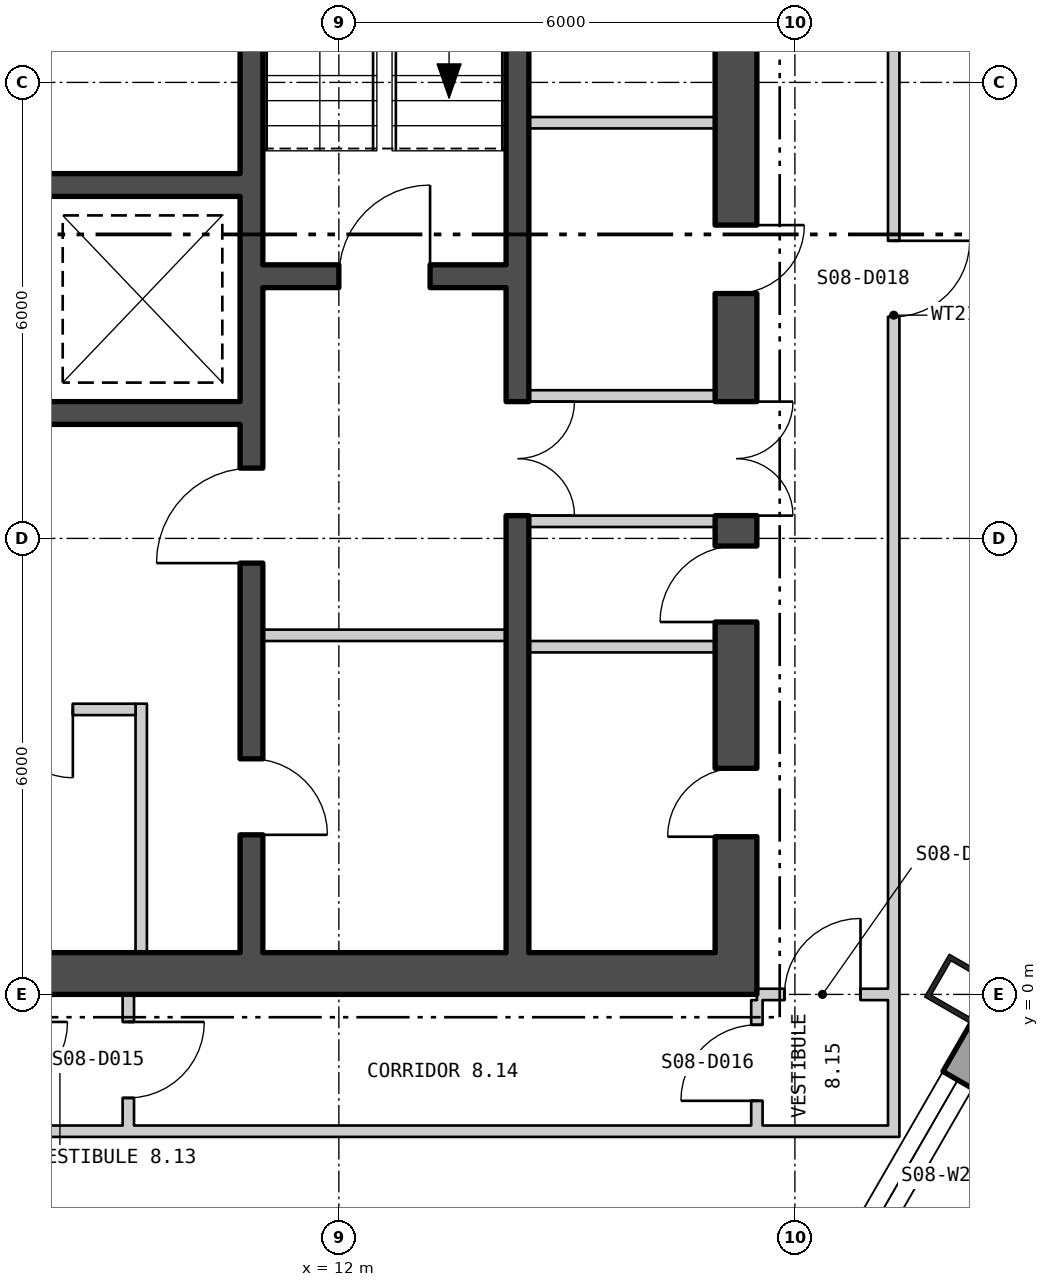
"""IFC4 building model, lengths in metres.
Left out: names, types, materials, properties, quantities, classifications, styles, units other than length and angle.
Written with IfcOpenShell. Run it as: python <this file> out.ifc"""

import sys

from ifc_helpers import new_model, si_unit, direction, frame, frame_2d, origin, origin_2d, place, context, subcontext, project, spatial, polyline, rectangle, hollow_rectangle, outline, extrude, element, fill, save


model = new_model("IFC4")
c1 = context("Model", 3, precision=1e-05, world=origin(), true_north=direction((0.0, 1.0)))
c2 = subcontext(c1, "Body", "Model", "MODEL_VIEW")
j1 = project(units=[si_unit("LENGTHUNIT", "METRE"), si_unit("PLANEANGLEUNIT", "RADIAN")], contexts=[c1])
p1 = place(None, origin())
s1 = spatial("IfcSite", under=j1, at=p1, CompositionType="ELEMENT")
p2 = place(p1, origin())
s2 = spatial("IfcBuilding", under=s1, at=p2, CompositionType="ELEMENT")
p3 = place(p2, frame((0.0, 0.0, 111.3)))
s3 = spatial("IfcBuildingStorey", under=s2, at=p3, CompositionType="ELEMENT", Elevation=111.3)
p4 = place(p3, frame((20.171, 0.074, 0.0), z_axis=(0.0, 0.0, 1.0), x_axis=(0.5, 0.866025403784, 0.0)))
e1 = element("IfcColumn", 1, at=p4, inside=s3, PredefinedType="COLUMN", context=c2, shape_type="SweptSolid", body=[
    extrude(hollow_rectangle(XDim=0.65, YDim=0.7, WallThickness=0.065, at=origin_2d()), origin(), (0.0, 0.0, 1.0), 4.5),
])
p5 = place(p3, frame((4.73, -27.821, -0.18), z_axis=(0.0, 0.0, 1.0), x_axis=(0.500000141277, 0.866025322218, 0.0)))
e2 = element("IfcWall", 2, at=p5, inside=s3, PredefinedType="SOLIDWALL", context=c2, shape_type="SweptSolid", body=[
    extrude(outline(polyline([(-0.13, -0.225), (45.86, -0.225), (45.6, 0.225), (0.13, 0.225), (-0.13, -0.225)])), origin(), (0.0, 0.0, 1.0), 4.28),
])
p6 = place(p5, frame((1.424, 0.0, 1.08)))
e3 = element("IfcOpeningElement", 3, at=p6, cuts=e2, PredefinedType="OPENING", context=c2, shape_type="SweptSolid", body=[
    extrude(rectangle(XDim=2.4, YDim=2.6, at=frame_2d((1.2, 1.3))), frame((0.0, 0.235, 0.0), z_axis=(0.0, -1.0, 0.0), x_axis=(1.0, 0.0, 0.0)), (0.0, 0.0, 1.0), 0.47),
])
p7 = place(p5, frame((5.892, 0.0, 1.08)))
e4 = element("IfcOpeningElement", 4, at=p7, cuts=e2, PredefinedType="OPENING", context=c2, shape_type="SweptSolid", body=[
    extrude(rectangle(XDim=2.4, YDim=2.6, at=frame_2d((1.2, 1.3))), frame((0.0, 0.235, 0.0), z_axis=(0.0, -1.0, 0.0), x_axis=(1.0, 0.0, 0.0)), (0.0, 0.0, 1.0), 0.47),
])
p8 = place(p5, frame((10.399, 0.0, 1.08)))
e5 = element("IfcOpeningElement", 5, at=p8, cuts=e2, PredefinedType="OPENING", context=c2, shape_type="SweptSolid", body=[
    extrude(rectangle(XDim=2.4, YDim=2.6, at=frame_2d((1.2, 1.3))), frame((0.0, 0.235, 0.0), z_axis=(0.0, -1.0, 0.0), x_axis=(1.0, 0.0, 0.0)), (0.0, 0.0, 1.0), 0.47),
])
p9 = place(p5, frame((14.905, 0.0, 1.08)))
e6 = element("IfcOpeningElement", 6, at=p9, cuts=e2, PredefinedType="OPENING", context=c2, shape_type="SweptSolid", body=[
    extrude(rectangle(XDim=2.4, YDim=2.6, at=frame_2d((1.2, 1.3))), frame((0.0, 0.235, 0.0), z_axis=(0.0, -1.0, 0.0), x_axis=(1.0, 0.0, 0.0)), (0.0, 0.0, 1.0), 0.47),
])
p10 = place(p5, frame((19.412, 0.0, 1.08)))
e7 = element("IfcOpeningElement", 7, at=p10, cuts=e2, PredefinedType="OPENING", context=c2, shape_type="SweptSolid", body=[
    extrude(rectangle(XDim=2.4, YDim=2.6, at=frame_2d((1.2, 1.3))), frame((0.0, 0.235, 0.0), z_axis=(0.0, -1.0, 0.0), x_axis=(1.0, 0.0, 0.0)), (0.0, 0.0, 1.0), 0.47),
])
p11 = place(p5, frame((23.918, 0.0, 1.08)))
e8 = element("IfcOpeningElement", 8, at=p11, cuts=e2, PredefinedType="OPENING", context=c2, shape_type="SweptSolid", body=[
    extrude(rectangle(XDim=2.4, YDim=2.6, at=frame_2d((1.2, 1.3))), frame((0.0, 0.235, 0.0), z_axis=(0.0, -1.0, 0.0), x_axis=(1.0, 0.0, 0.0)), (0.0, 0.0, 1.0), 0.47),
])
p12 = place(p5, frame((28.425, 0.0, 1.08)))
e9 = element("IfcOpeningElement", 9, at=p12, cuts=e2, PredefinedType="OPENING", context=c2, shape_type="SweptSolid", body=[
    extrude(rectangle(XDim=2.4, YDim=2.6, at=frame_2d((1.2, 1.3))), frame((0.0, 0.235, 0.0), z_axis=(0.0, -1.0, 0.0), x_axis=(1.0, 0.0, 0.0)), (0.0, 0.0, 1.0), 0.47),
])
p13 = place(p5, frame((32.932, 0.0, 1.08)))
e10 = element("IfcOpeningElement", 10, at=p13, cuts=e2, PredefinedType="OPENING", context=c2, shape_type="SweptSolid", body=[
    extrude(rectangle(XDim=2.4, YDim=2.6, at=frame_2d((1.2, 1.3))), frame((0.0, 0.235, 0.0), z_axis=(0.0, -1.0, 0.0), x_axis=(1.0, 0.0, 0.0)), (0.0, 0.0, 1.0), 0.47),
])
p14 = place(p5, frame((37.438, 0.0, 1.08)))
e11 = element("IfcOpeningElement", 11, at=p14, cuts=e2, PredefinedType="OPENING", context=c2, shape_type="SweptSolid", body=[
    extrude(rectangle(XDim=2.4, YDim=2.6, at=frame_2d((1.2, 1.3))), frame((0.0, 0.235, 0.0), z_axis=(0.0, -1.0, 0.0), x_axis=(1.0, 0.0, 0.0)), (0.0, 0.0, 1.0), 0.47),
])
p15 = place(p5, frame((41.907, 0.0, 1.08)))
e12 = element("IfcOpeningElement", 12, at=p15, cuts=e2, PredefinedType="OPENING", context=c2, shape_type="SweptSolid", body=[
    extrude(rectangle(XDim=2.4, YDim=2.6, at=frame_2d((1.2, 1.3))), frame((0.0, 0.235, 0.0), z_axis=(0.0, -1.0, 0.0), x_axis=(1.0, 0.0, 0.0)), (0.0, 0.0, 1.0), 0.47),
])
p16 = place(p3, frame((-17.5, 0.275, 0.0), z_axis=(0.0, 0.0, 1.0), x_axis=(1.0, 0.0, 0.0)))
e13 = element("IfcWall", 13, at=p16, inside=s3, PredefinedType="SHEAR", context=c2, shape_type="SweptSolid", body=[
    extrude(rectangle(XDim=35.0, YDim=0.55, at=frame_2d((17.5, 0.0))), origin(), (0.0, 0.0, 1.0), 4.3),
])
p17 = place(p16, frame((12.0, 0.0, 0.0)))
e14 = element("IfcOpeningElement", 14, at=p17, cuts=e13, PredefinedType="OPENING", context=c2, shape_type="SweptSolid", body=[
    extrude(rectangle(XDim=1.8, YDim=2.4, at=frame_2d((0.9, 1.2))), frame((0.0, 0.285, 0.0), z_axis=(0.0, -1.0, 0.0), x_axis=(1.0, 0.0, 0.0)), (0.0, 0.0, 1.0), 0.57),
])
p18 = place(p16, frame((22.0, 0.0, 0.0)))
e15 = element("IfcOpeningElement", 15, at=p18, cuts=e13, PredefinedType="OPENING", context=c2, shape_type="SweptSolid", body=[
    extrude(rectangle(XDim=1.8, YDim=2.4, at=frame_2d((0.9, 1.2))), frame((0.0, 0.285, 0.0), z_axis=(0.0, -1.0, 0.0), x_axis=(1.0, 0.0, 0.0)), (0.0, 0.0, 1.0), 0.57),
])
p19 = place(p3, frame((17.225, 0.55, 0.0), z_axis=(0.0, 0.0, 1.0), x_axis=(0.0, 1.0, 0.0)))
e16 = element("IfcWall", 16, at=p19, inside=s3, PredefinedType="SHEAR", context=c2, shape_type="SweptSolid", body=[
    extrude(rectangle(XDim=16.9, YDim=0.55, at=frame_2d((8.45, 0.0))), origin(), (0.0, 0.0, 1.0), 4.3),
])
p20 = place(p19, frame((5.75, 0.0, 0.0)))
e17 = element("IfcOpeningElement", 17, at=p20, cuts=e16, PredefinedType="OPENING", context=c2, shape_type="SweptSolid", body=[
    extrude(rectangle(XDim=1.5, YDim=2.1, at=frame_2d((0.75, 1.05))), frame((0.0, 0.285, 0.0), z_axis=(0.0, -1.0, 0.0), x_axis=(1.0, 0.0, 0.0)), (0.0, 0.0, 1.0), 0.57),
])
p21 = place(p19, frame((1.525, 0.0, 0.0)))
e18 = element("IfcOpeningElement", 18, at=p21, cuts=e16, PredefinedType="OPENING", context=c2, shape_type="SweptSolid", body=[
    extrude(rectangle(XDim=0.9, YDim=2.1, at=frame_2d((0.45, 1.05))), frame((0.0, 0.285, 0.0), z_axis=(0.0, -1.0, 0.0), x_axis=(1.0, 0.0, 0.0)), (0.0, 0.0, 1.0), 0.57),
])
p22 = place(p19, frame((4.35, 0.0, 0.0)))
e19 = element("IfcOpeningElement", 19, at=p22, cuts=e16, PredefinedType="OPENING", context=c2, shape_type="SweptSolid", body=[
    extrude(rectangle(XDim=1.0, YDim=2.1, at=frame_2d((0.5, 1.05))), frame((0.0, 0.285, 0.0), z_axis=(0.0, -1.0, 0.0), x_axis=(1.0, 0.0, 0.0)), (0.0, 0.0, 1.0), 0.57),
])
p23 = place(p19, frame((8.672, 0.0, 0.0)))
e20 = element("IfcOpeningElement", 20, at=p23, cuts=e16, PredefinedType="OPENING", context=c2, shape_type="SweptSolid", body=[
    extrude(rectangle(XDim=0.9, YDim=2.1, at=frame_2d((0.45, 1.05))), frame((0.0, 0.285, 0.0), z_axis=(0.0, -1.0, 0.0), x_axis=(1.0, 0.0, 0.0)), (0.0, 0.0, 1.0), 0.57),
])
p24 = place(p19, frame((13.497, 0.0, 0.0)))
e21 = element("IfcOpeningElement", 21, at=p24, cuts=e16, PredefinedType="OPENING", context=c2, shape_type="SweptSolid", body=[
    extrude(rectangle(XDim=0.9, YDim=2.1, at=frame_2d((0.45, 1.05))), frame((0.0, 0.285, 0.0), z_axis=(0.0, -1.0, 0.0), x_axis=(1.0, 0.0, 0.0)), (0.0, 0.0, 1.0), 0.57),
])
p25 = place(p3, frame((10.85, 0.55, 0.0), z_axis=(0.0, 0.0, 1.0), x_axis=(0.0, 1.0, 0.0)))
e22 = element("IfcWall", 22, at=p25, inside=s3, PredefinedType="SHEAR", context=c2, shape_type="SweptSolid", body=[
    extrude(rectangle(XDim=16.9, YDim=0.3, at=frame_2d((8.45, 0.0))), origin(), (0.0, 0.0, 1.0), 4.3),
])
p26 = place(p25, frame((5.125, 0.0, 0.0)))
e23 = element("IfcOpeningElement", 23, at=p26, cuts=e22, PredefinedType="OPENING", context=c2, shape_type="SweptSolid", body=[
    extrude(rectangle(XDim=1.25, YDim=2.1, at=frame_2d((0.625, 1.05))), frame((0.0, 0.16, 0.0), z_axis=(0.0, -1.0, 0.0), x_axis=(1.0, 0.0, 0.0)), (0.0, 0.0, 1.0), 0.32),
])
p27 = place(p25, frame((1.55, 0.0, 0.0)))
e24 = element("IfcOpeningElement", 24, at=p27, cuts=e22, PredefinedType="OPENING", context=c2, shape_type="SweptSolid", body=[
    extrude(rectangle(XDim=1.0, YDim=2.1, at=frame_2d((0.5, 1.05))), frame((0.0, 0.16, 0.0), z_axis=(0.0, -1.0, 0.0), x_axis=(1.0, 0.0, 0.0)), (0.0, 0.0, 1.0), 0.32),
])
p28 = place(p3, frame((14.35, 0.55, 0.0), z_axis=(0.0, 0.0, 1.0), x_axis=(0.0, 1.0, 0.0)))
e25 = element("IfcWall", 25, at=p28, inside=s3, PredefinedType="SHEAR", context=c2, shape_type="SweptSolid", body=[
    extrude(rectangle(XDim=16.9, YDim=0.3, at=frame_2d((8.45, 0.0))), origin(), (0.0, 0.0, 1.0), 4.3),
])
p29 = place(p28, frame((5.75, 0.0, 0.0)))
e26 = element("IfcOpeningElement", 26, at=p29, cuts=e25, PredefinedType="OPENING", context=c2, shape_type="SweptSolid", body=[
    extrude(rectangle(XDim=1.5, YDim=2.1, at=frame_2d((0.75, 1.05))), frame((0.0, 0.16, 0.0), z_axis=(0.0, -1.0, 0.0), x_axis=(1.0, 0.0, 0.0)), (0.0, 0.0, 1.0), 0.32),
])
p30 = place(p3, frame((11.0, 9.45, 0.0), z_axis=(0.0, 0.0, 1.0), x_axis=(1.0, 0.0, 0.0)))
e27 = element("IfcWall", 27, at=p30, inside=s3, PredefinedType="SHEAR", context=c2, shape_type="SweptSolid", body=[
    extrude(rectangle(XDim=3.2, YDim=0.3, at=frame_2d((1.6, 0.0))), origin(), (0.0, 0.0, 1.0), 4.3),
])
p31 = place(p30, frame((1.0, 0.0, 0.0)))
e28 = element("IfcOpeningElement", 28, at=p31, cuts=e27, PredefinedType="OPENING", context=c2, shape_type="SweptSolid", body=[
    extrude(rectangle(XDim=1.2, YDim=2.1, at=frame_2d((0.6, 1.05))), frame((0.0, 0.16, 0.0), z_axis=(0.0, -1.0, 0.0), x_axis=(1.0, 0.0, 0.0)), (0.0, 0.0, 1.0), 0.32),
])
for number, where, z_axis, x_axis in (
    (29, (2.6, 10.65, 0.0), (0.0, 0.0, 1.0), (1.0, 0.0, 0.0)),
    (30, (2.6, 7.65, 0.0), (0.0, 0.0, 1.0), (1.0, 0.0, 0.0)),
):
    element("IfcWall", number, at=place(p3, frame(where, z_axis=z_axis, x_axis=x_axis)), inside=s3, PredefinedType="SHEAR", context=c2, shape_type="SweptSolid", body=[
        extrude(rectangle(XDim=8.1, YDim=0.3, at=frame_2d((4.05, 0.0))), origin(), (0.0, 0.0, 1.0), 4.3),
    ])
p32 = place(p3, frame((11.0, 4.725, 0.0), z_axis=(0.0, 0.0, 1.0), x_axis=(1.0, 0.0, 0.0)))
e31 = element("IfcWall", 31, at=p32, inside=s3, PredefinedType="PARTITIONING", context=c2, shape_type="SweptSolid", body=[
    extrude(rectangle(XDim=3.2, YDim=0.15, at=frame_2d((1.6, 0.0))), origin(), (0.0, 0.0, 1.0), 4.3),
])
for number, where, z_axis, x_axis in (
    (32, (14.5, 6.225, 0.0), (0.0, 0.0, 1.0), (1.0, 0.0, 0.0)),
    (33, (14.5, 7.875, 0.0), (0.0, 0.0, 1.0), (1.0, 0.0, 0.0)),
    (34, (14.5, 4.575, 0.0), (0.0, 0.0, 1.0), (1.0, 0.0, 0.0)),
    (35, (14.5, 11.47, 0.0), (0.0, 0.0, 1.0), (1.0, 0.0, 0.0)),
):
    element("IfcWall", number, at=place(p3, frame(where, z_axis=z_axis, x_axis=x_axis)), inside=s3, PredefinedType="PARTITIONING", context=c2, shape_type="SweptSolid", body=[
        extrude(rectangle(XDim=2.45, YDim=0.15, at=frame_2d((1.225, 0.0))), origin(), (0.0, 0.0, 1.0), 4.3),
    ])
p33 = place(p3, frame((9.4, 0.55, 0.0), z_axis=(0.0, 0.0, 1.0), x_axis=(0.0, 1.0, 0.0)))
e36 = element("IfcWall", 36, at=p33, inside=s3, PredefinedType="PARTITIONING", context=c2, shape_type="SweptSolid", body=[
    extrude(rectangle(XDim=3.275, YDim=0.15, at=frame_2d((1.637, 0.0))), origin(), (0.0, 0.0, 1.0), 4.3),
])
p34 = place(p3, frame((6.775, 3.75, 0.0), z_axis=(0.0, 0.0, 1.0), x_axis=(1.0, 0.0, 0.0)))
e37 = element("IfcWall", 37, at=p34, inside=s3, PredefinedType="PARTITIONING", context=c2, shape_type="SweptSolid", body=[
    extrude(rectangle(XDim=2.55, YDim=0.15, at=frame_2d((1.275, 0.0))), origin(), (0.0, 0.0, 1.0), 4.3),
])
p35 = place(p34, frame((0.825, 0.0, 0.0)))
e38 = element("IfcOpeningElement", 38, at=p35, cuts=e37, PredefinedType="OPENING", context=c2, shape_type="SweptSolid", body=[
    extrude(rectangle(XDim=0.9, YDim=2.1, at=frame_2d((0.45, 1.05))), frame((0.0, 0.085, 0.0), z_axis=(0.0, -1.0, 0.0), x_axis=(1.0, 0.0, 0.0)), (0.0, 0.0, 1.0), 0.17),
])
p36 = place(p3, frame((7.435, -1.8, 0.0), z_axis=(0.0, 0.0, 1.0), x_axis=(1.0, 0.0, 0.0)))
e39 = element("IfcWall", 39, at=p36, inside=s3, PredefinedType="PARTITIONING", context=c2, shape_type="SweptSolid", body=[
    extrude(rectangle(XDim=11.79, YDim=0.15, at=frame_2d((5.895, 0.0))), origin(), (0.0, 0.0, 1.0), 4.3),
])
p37 = place(p3, frame((9.23, -1.725, 0.0), z_axis=(0.0, 0.0, 1.0), x_axis=(0.0, 1.0, 0.0)))
e40 = element("IfcWall", 40, at=p37, inside=s3, PredefinedType="PARTITIONING", context=c2, shape_type="SweptSolid", body=[
    extrude(rectangle(XDim=1.725, YDim=0.15, at=frame_2d((0.863, 0.0))), origin(), (0.0, 0.0, 1.0), 4.3),
])
p38 = place(p37, frame((0.363, 0.0, 0.0)))
e41 = element("IfcOpeningElement", 41, at=p38, cuts=e40, PredefinedType="OPENING", context=c2, shape_type="SweptSolid", body=[
    extrude(rectangle(XDim=1.0, YDim=2.1, at=frame_2d((0.5, 1.05))), frame((0.0, 0.085, 0.0), z_axis=(0.0, -1.0, 0.0), x_axis=(1.0, 0.0, 0.0)), (0.0, 0.0, 1.0), 0.17),
])
p39 = place(p3, frame((17.5, -1.725, 0.0), z_axis=(0.0, 0.0, 1.0), x_axis=(0.0, 1.0, 0.0)))
e42 = element("IfcWall", 42, at=p39, inside=s3, PredefinedType="PARTITIONING", context=c2, shape_type="SweptSolid", body=[
    extrude(rectangle(XDim=1.65, YDim=0.15, at=frame_2d((0.825, 0.0))), origin(), (0.0, 0.0, 1.0), 4.3),
])
p40 = place(p39, frame((0.325, 0.0, 0.0)))
e43 = element("IfcOpeningElement", 43, at=p40, cuts=e42, PredefinedType="OPENING", context=c2, shape_type="SweptSolid", body=[
    extrude(rectangle(XDim=1.0, YDim=2.1, at=frame_2d((0.5, 1.05))), frame((0.0, 0.085, 0.0), z_axis=(0.0, -1.0, 0.0), x_axis=(1.0, 0.0, 0.0)), (0.0, 0.0, 1.0), 0.17),
])
p41 = place(p3, frame((17.5, 0.0, 0.0), z_axis=(0.0, 0.0, 1.0), x_axis=(1.0, 0.0, 0.0)))
e44 = element("IfcWall", 44, at=p41, inside=s3, PredefinedType="PARTITIONING", context=c2, shape_type="SweptSolid", body=[
    extrude(rectangle(XDim=1.725, YDim=0.15, at=frame_2d((0.863, 0.0))), origin(), (0.0, 0.0, 1.0), 3.7),
])
p42 = place(p41, frame((0.363, 0.0, 0.0)))
e45 = element("IfcOpeningElement", 45, at=p42, cuts=e44, PredefinedType="OPENING", context=c2, shape_type="SweptSolid", body=[
    extrude(rectangle(XDim=1.0, YDim=2.1, at=frame_2d((0.5, 1.05))), frame((0.0, 0.085, 0.0), z_axis=(0.0, -1.0, 0.0), x_axis=(1.0, 0.0, 0.0)), (0.0, 0.0, 1.0), 0.17),
])
p43 = place(p3, frame((19.3, -1.875, 0.0), z_axis=(0.0, 0.0, 1.0), x_axis=(0.0, 1.0, 0.0)))
e46 = element("IfcWall", 46, at=p43, inside=s3, PredefinedType="PARTITIONING", context=c2, shape_type="SweptSolid", body=[
    extrude(rectangle(XDim=21.625, YDim=0.15, at=frame_2d((10.812, 0.0))), origin(), (0.0, 0.0, 1.0), 4.3),
])
p44 = place(p43, frame((10.791, 0.0, 0.0)))
e47 = element("IfcOpeningElement", 47, at=p44, cuts=e46, PredefinedType="OPENING", context=c2, shape_type="SweptSolid", body=[
    extrude(rectangle(XDim=1.0, YDim=2.1, at=frame_2d((0.5, 1.05))), frame((0.0, 0.085, 0.0), z_axis=(0.0, -1.0, 0.0), x_axis=(1.0, 0.0, 0.0)), (0.0, 0.0, 1.0), 0.17),
])
p45 = place(p12, origin())
e48 = element("IfcWindow", 48, at=p45, inside=s3, PartitioningType="SINGLE_PANEL", PredefinedType="WINDOW", context=c2, shape_type="SweptSolid", body=[
    extrude(rectangle(XDim=2.4, YDim=2.6, at=frame_2d((1.2, 1.3))), frame((0.0, 0.105, 0.0), z_axis=(0.0, -1.0, 0.0), x_axis=(1.0, 0.0, 0.0)), (0.0, 0.0, 1.0), 0.06),
])
fill(e9, e48)
p46 = place(p31, origin())
e49 = element("IfcDoor", 49, at=p46, inside=s3, OperationType="SINGLE_SWING_LEFT", PredefinedType="DOOR", context=c2, shape_type="SweptSolid", body=[
    extrude(rectangle(XDim=1.2, YDim=2.1, at=frame_2d((0.6, 1.05))), frame((0.0, 0.025, 0.0), z_axis=(0.0, -1.0, 0.0), x_axis=(1.0, 0.0, 0.0)), (0.0, 0.0, 1.0), 0.05),
])
fill(e28, e49)
p47 = place(p26, origin())
e50 = element("IfcDoor", 50, at=p47, inside=s3, OperationType="SINGLE_SWING_RIGHT", PredefinedType="DOOR", context=c2, shape_type="SweptSolid", body=[
    extrude(rectangle(XDim=1.25, YDim=2.1, at=frame_2d((0.625, 1.05))), frame((0.0, 0.025, 0.0), z_axis=(0.0, -1.0, 0.0), x_axis=(1.0, 0.0, 0.0)), (0.0, 0.0, 1.0), 0.05),
])
fill(e23, e50)
p48 = place(p27, origin())
e51 = element("IfcDoor", 51, at=p48, inside=s3, OperationType="SINGLE_SWING_LEFT", PredefinedType="DOOR", context=c2, shape_type="SweptSolid", body=[
    extrude(rectangle(XDim=1.0, YDim=2.1, at=frame_2d((0.5, 1.05))), frame((0.0, 0.025, 0.0), z_axis=(0.0, -1.0, 0.0), x_axis=(1.0, 0.0, 0.0)), (0.0, 0.0, 1.0), 0.05),
])
fill(e24, e51)
p49 = place(p29, origin())
e52 = element("IfcDoor", 52, at=p49, inside=s3, OperationType="DOUBLE_DOOR_SINGLE_SWING", PredefinedType="DOOR", context=c2, shape_type="SweptSolid", body=[
    extrude(rectangle(XDim=1.5, YDim=2.1, at=frame_2d((0.75, 1.05))), frame((0.0, 0.025, 0.0), z_axis=(0.0, -1.0, 0.0), x_axis=(1.0, 0.0, 0.0)), (0.0, 0.0, 1.0), 0.05),
])
fill(e26, e52)
p50 = place(p20, origin())
e53 = element("IfcDoor", 53, at=p50, inside=s3, OperationType="DOUBLE_DOOR_SINGLE_SWING", PredefinedType="DOOR", context=c2, shape_type="SweptSolid", body=[
    extrude(rectangle(XDim=1.5, YDim=2.1, at=frame_2d((0.75, 1.05))), frame((0.0, 0.025, 0.0), z_axis=(0.0, -1.0, 0.0), x_axis=(1.0, 0.0, 0.0)), (0.0, 0.0, 1.0), 0.05),
])
fill(e17, e53)
p51 = place(p21, origin())
e54 = element("IfcDoor", 54, at=p51, inside=s3, OperationType="SINGLE_SWING_RIGHT", PredefinedType="DOOR", context=c2, shape_type="SweptSolid", body=[
    extrude(rectangle(XDim=0.9, YDim=2.1, at=frame_2d((0.45, 1.05))), frame((0.0, 0.025, 0.0), z_axis=(0.0, -1.0, 0.0), x_axis=(1.0, 0.0, 0.0)), (0.0, 0.0, 1.0), 0.05),
])
fill(e18, e54)
p52 = place(p22, origin())
e55 = element("IfcDoor", 55, at=p52, inside=s3, OperationType="SINGLE_SWING_RIGHT", PredefinedType="DOOR", context=c2, shape_type="SweptSolid", body=[
    extrude(rectangle(XDim=1.0, YDim=2.1, at=frame_2d((0.5, 1.05))), frame((0.0, 0.025, 0.0), z_axis=(0.0, -1.0, 0.0), x_axis=(1.0, 0.0, 0.0)), (0.0, 0.0, 1.0), 0.05),
])
fill(e19, e55)
p53 = place(p23, origin())
e56 = element("IfcDoor", 56, at=p53, inside=s3, OperationType="SINGLE_SWING_RIGHT", PredefinedType="DOOR", context=c2, shape_type="SweptSolid", body=[
    extrude(rectangle(XDim=0.9, YDim=2.1, at=frame_2d((0.45, 1.05))), frame((0.0, 0.025, 0.0), z_axis=(0.0, -1.0, 0.0), x_axis=(1.0, 0.0, 0.0)), (0.0, 0.0, 1.0), 0.05),
])
fill(e20, e56)
p54 = place(p35, origin())
e57 = element("IfcDoor", 57, at=p54, inside=s3, OperationType="SINGLE_SWING_RIGHT", PredefinedType="DOOR", context=c2, shape_type="SweptSolid", body=[
    extrude(rectangle(XDim=0.9, YDim=2.1, at=frame_2d((0.45, 1.05))), frame((0.0, 0.025, 0.0), z_axis=(0.0, -1.0, 0.0), x_axis=(1.0, 0.0, 0.0)), (0.0, 0.0, 1.0), 0.05),
])
fill(e38, e57)
p55 = place(p38, origin())
e58 = element("IfcDoor", 58, at=p55, inside=s3, OperationType="SINGLE_SWING_RIGHT", PredefinedType="DOOR", context=c2, shape_type="SweptSolid", body=[
    extrude(rectangle(XDim=1.0, YDim=2.1, at=frame_2d((0.5, 1.05))), frame((0.0, 0.025, 0.0), z_axis=(0.0, -1.0, 0.0), x_axis=(1.0, 0.0, 0.0)), (0.0, 0.0, 1.0), 0.05),
])
fill(e41, e58)
p56 = place(p40, origin())
e59 = element("IfcDoor", 59, at=p56, inside=s3, OperationType="SINGLE_SWING_RIGHT", PredefinedType="DOOR", context=c2, shape_type="SweptSolid", body=[
    extrude(rectangle(XDim=1.0, YDim=2.1, at=frame_2d((0.5, 1.05))), frame((0.0, 0.025, 0.0), z_axis=(0.0, -1.0, 0.0), x_axis=(1.0, 0.0, 0.0)), (0.0, 0.0, 1.0), 0.05),
])
fill(e43, e59)
p57 = place(p42, origin())
e60 = element("IfcDoor", 60, at=p57, inside=s3, OperationType="SINGLE_SWING_LEFT", PredefinedType="DOOR", context=c2, shape_type="SweptSolid", body=[
    extrude(rectangle(XDim=1.0, YDim=2.1, at=frame_2d((0.5, 1.05))), frame((0.0, 0.025, 0.0), z_axis=(0.0, -1.0, 0.0), x_axis=(1.0, 0.0, 0.0)), (0.0, 0.0, 1.0), 0.05),
])
fill(e45, e60)
p58 = place(p44, origin())
e61 = element("IfcDoor", 61, at=p58, inside=s3, OperationType="SINGLE_SWING_RIGHT", PredefinedType="DOOR", context=c2, shape_type="SweptSolid", body=[
    extrude(rectangle(XDim=1.0, YDim=2.1, at=frame_2d((0.5, 1.05))), frame((0.0, 0.025, 0.0), z_axis=(0.0, -1.0, 0.0), x_axis=(1.0, 0.0, 0.0)), (0.0, 0.0, 1.0), 0.05),
])
fill(e47, e61)
save(model, sys.argv[1])
